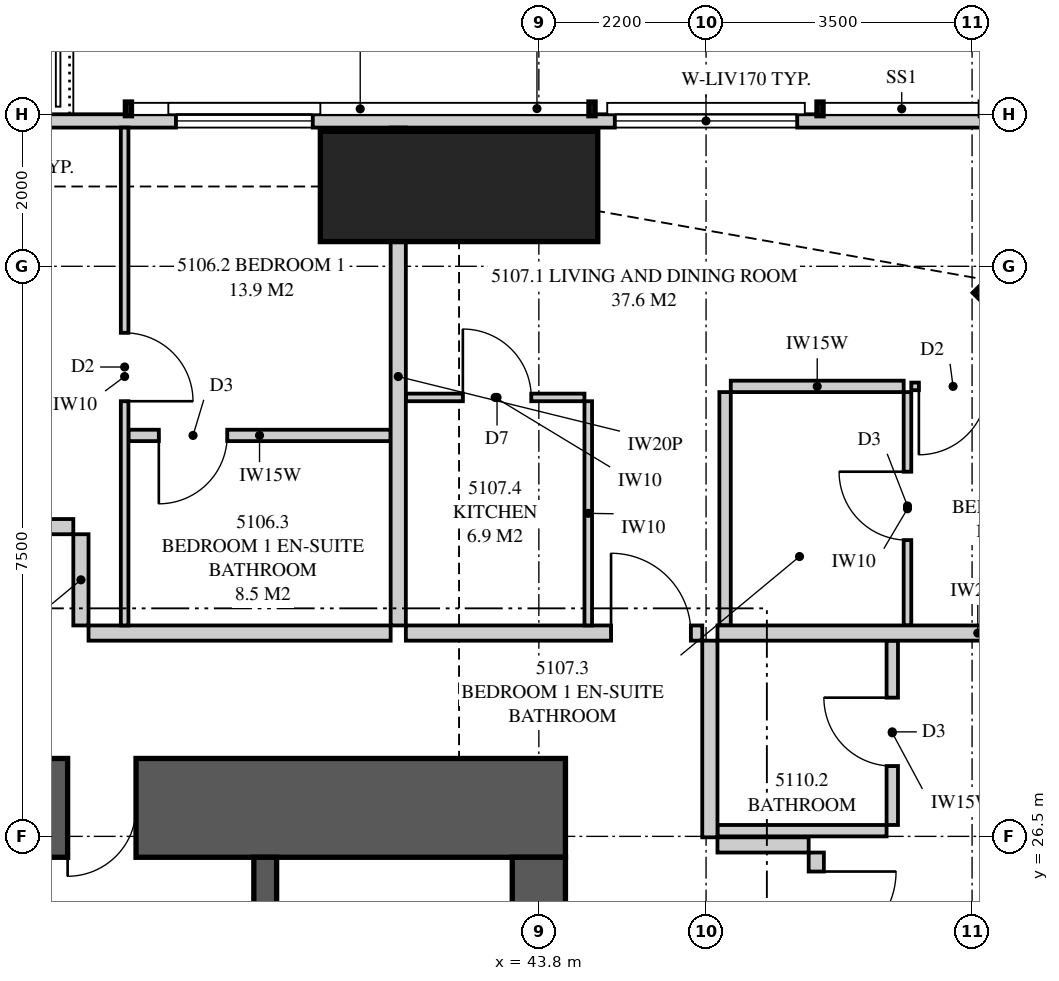
"""IFC4 building model, lengths in metres.
Left out: names, types, materials, properties, quantities, classifications, styles, units other than length and angle.
Written with IfcOpenShell. Run it as: python <this file> out.ifc"""

import sys

from ifc_helpers import new_model, si_unit, direction, frame, frame_2d, origin, origin_2d, place, context, subcontext, project, spatial, polyline, rectangle, outline, extrude, element, fill, save


model = new_model("IFC4")
c1 = context("Model", 3, precision=1e-05, world=origin(), true_north=direction((0.0, 1.0)))
c2 = subcontext(c1, "Body", "Model", "MODEL_VIEW")
j1 = project(units=[si_unit("LENGTHUNIT", "METRE"), si_unit("PLANEANGLEUNIT", "RADIAN")], contexts=[c1])
p1 = place(None, origin())
s1 = spatial("IfcSite", under=j1, at=p1, CompositionType="ELEMENT")
p2 = place(p1, origin())
s2 = spatial("IfcBuilding", under=s1, at=p2, CompositionType="ELEMENT")
p3 = place(p2, frame((0.0, 0.0, 187.85)))
s3 = spatial("IfcBuildingStorey", under=s2, at=p3, CompositionType="ELEMENT", Elevation=187.85)
p4 = place(p3, frame((50.652, 33.652, 0.0), z_axis=(0.0, 0.0, 1.0), x_axis=(0.707106781187, 0.707106781187, 0.0)))
e1 = element("IfcColumn", 1, at=p4, inside=s3, PredefinedType="COLUMN", context=c2, shape_type="SweptSolid", body=[
    extrude(rectangle(XDim=1.6, YDim=1.6, at=origin_2d()), origin(), (0.0, 0.0, 1.0), 3.35),
])
p5 = place(p3, frame((42.75, 35.05, 0.0), z_axis=(0.0, 0.0, 1.0), x_axis=(0.0, 1.0, 0.0)))
e2 = element("IfcColumn", 2, at=p5, inside=s3, PredefinedType="COLUMN", context=c2, shape_type="SweptSolid", body=[
    extrude(rectangle(XDim=1.45, YDim=3.65, at=origin_2d()), origin(), (0.0, 0.0, 1.0), 3.35),
])
p6 = place(p3, frame((44.15, 26.875, 0.0), z_axis=(0.0, 0.0, 1.0), x_axis=(-1.0, 0.0, 0.0)))
e3 = element("IfcWall", 3, at=p6, inside=s3, PredefinedType="SHEAR", context=c2, shape_type="SweptSolid", body=[
    extrude(rectangle(XDim=8.25, YDim=1.3, at=frame_2d((4.125, 0.0))), origin(), (0.0, 0.0, 1.0), 3.35),
])
p7 = place(p6, frame((5.65, 0.0, 0.0)))
e4 = element("IfcOpeningElement", 4, at=p7, cuts=e3, PredefinedType="OPENING", context=c2, shape_type="SweptSolid", body=[
    extrude(rectangle(XDim=0.9, YDim=2.1, at=frame_2d((0.45, 1.05))), frame((0.0, 0.66, 0.0), z_axis=(0.0, -1.0, 0.0), x_axis=(1.0, 0.0, 0.0)), (0.0, 0.0, 1.0), 1.32),
])
p8 = place(p3, frame((43.8, 19.3, 0.0), z_axis=(0.0, 0.0, 1.0), x_axis=(0.0, 1.0, 0.0)))
e5 = element("IfcWall", 5, at=p8, inside=s3, PredefinedType="SHEAR", context=c2, shape_type="SweptSolid", body=[
    extrude(rectangle(XDim=6.925, YDim=0.7, at=frame_2d((3.462, 0.0))), origin(), (0.0, 0.0, 1.0), 3.35),
])
p9 = place(p3, frame((40.2, 18.5, 0.0), z_axis=(0.0, 0.0, 1.0), x_axis=(0.0, 1.0, 0.0)))
e6 = element("IfcWall", 6, at=p9, inside=s3, PredefinedType="SHEAR", context=c2, shape_type="SweptSolid", body=[
    extrude(rectangle(XDim=7.725, YDim=0.3, at=frame_2d((3.863, 0.0))), origin(), (0.0, 0.0, 1.0), 3.35),
])
p10 = place(p3, frame((49.949, 35.913, 0.0), z_axis=(0.0, 0.0, 1.0), x_axis=(-1.0, 0.0, 0.0)))
e7 = element("IfcWall", 7, at=p10, inside=s3, PredefinedType="SOLIDWALL", context=c2, shape_type="SweptSolid", body=[
    extrude(outline(polyline([(0.0, 0.0), (34.897, 0.0), (34.897, 3.11), (27.91, 3.11), (27.91, 2.15), (27.836, 2.15), (27.836, 3.11), (27.699, 3.11), (27.699, 2.15), (7.199, 2.15), (7.199, 3.11), (7.062, 3.11), (7.062, 2.15), (6.987, 2.15), (6.987, 3.11), (0.0, 3.11), (0.0, 0.0)])), frame((0.0, 0.087, 0.0), z_axis=(0.0, -1.0, 0.0), x_axis=(1.0, 0.0, 0.0)), (0.0, 0.0, 1.0), 0.175),
])
p11 = place(p10, frame((2.75, 0.0, 0.4)))
e8 = element("IfcOpeningElement", 8, at=p11, cuts=e7, PredefinedType="OPENING", context=c2, shape_type="SweptSolid", body=[
    extrude(rectangle(XDim=2.4, YDim=1.7, at=frame_2d((1.2, 0.85))), frame((0.0, 0.097, 0.0), z_axis=(0.0, -1.0, 0.0), x_axis=(1.0, 0.0, 0.0)), (0.0, 0.0, 1.0), 0.195),
])
p12 = place(p10, frame((9.124, 0.0, 0.4)))
e9 = element("IfcOpeningElement", 9, at=p12, cuts=e7, PredefinedType="OPENING", context=c2, shape_type="SweptSolid", body=[
    extrude(rectangle(XDim=1.8, YDim=1.7, at=frame_2d((0.9, 0.85))), frame((0.0, 0.097, 0.0), z_axis=(0.0, -1.0, 0.0), x_axis=(1.0, 0.0, 0.0)), (0.0, 0.0, 1.0), 0.195),
])
p13 = place(p10, frame((13.174, 0.0, 0.0)))
e10 = element("IfcOpeningElement", 10, at=p13, cuts=e7, PredefinedType="OPENING", context=c2, shape_type="SweptSolid", body=[
    extrude(rectangle(XDim=1.8, YDim=2.1, at=frame_2d((0.9, 1.05))), frame((0.0, 0.097, 0.0), z_axis=(0.0, -1.0, 0.0), x_axis=(1.0, 0.0, 0.0)), (0.0, 0.0, 1.0), 0.195),
])
p14 = place(p10, frame((19.849, 0.0, 0.4)))
e11 = element("IfcOpeningElement", 11, at=p14, cuts=e7, PredefinedType="OPENING", context=c2, shape_type="SweptSolid", body=[
    extrude(rectangle(XDim=1.8, YDim=1.7, at=frame_2d((0.9, 0.85))), frame((0.0, 0.097, 0.0), z_axis=(0.0, -1.0, 0.0), x_axis=(1.0, 0.0, 0.0)), (0.0, 0.0, 1.0), 0.195),
])
p15 = place(p10, frame((23.304, 0.0, 0.4)))
e12 = element("IfcOpeningElement", 12, at=p15, cuts=e7, PredefinedType="OPENING", context=c2, shape_type="SweptSolid", body=[
    extrude(rectangle(XDim=2.4, YDim=1.7, at=frame_2d((1.2, 0.85))), frame((0.0, 0.097, 0.0), z_axis=(0.0, -1.0, 0.0), x_axis=(1.0, 0.0, 0.0)), (0.0, 0.0, 1.0), 0.195),
])
p16 = place(p10, frame((30.249, 0.0, 0.4)))
e13 = element("IfcOpeningElement", 13, at=p16, cuts=e7, PredefinedType="OPENING", context=c2, shape_type="SweptSolid", body=[
    extrude(rectangle(XDim=1.8, YDim=1.7, at=frame_2d((0.9, 0.85))), frame((0.0, 0.097, 0.0), z_axis=(0.0, -1.0, 0.0), x_axis=(1.0, 0.0, 0.0)), (0.0, 0.0, 1.0), 0.195),
])
p17 = place(p3, frame((41.95, 35.825, 0.0), z_axis=(0.0, 0.0, 1.0), x_axis=(0.0, -1.0, 0.0)))
e14 = element("IfcWall", 14, at=p17, inside=s3, PredefinedType="PARTITIONING", context=c2, shape_type="SweptSolid", body=[
    extrude(outline(polyline([(0.529, 2.15), (0.0, 2.15), (0.0, 0.0), (0.529, 0.0), (0.529, 0.746), (1.021, 0.746), (1.021, 0.0), (6.55, 0.0), (6.55, 3.11), (1.685, 3.11), (1.685, 2.15), (1.021, 2.15), (1.021, 1.404), (0.529, 1.404), (0.529, 2.15)])), frame((0.0, 0.1, 0.0), z_axis=(0.0, -1.0, 0.0), x_axis=(1.0, 0.0, 0.0)), (0.0, 0.0, 1.0), 0.2),
])
p18 = place(p3, frame((38.35, 35.825, 0.0), z_axis=(0.0, 0.0, 1.0), x_axis=(0.0, -1.0, 0.0)))
e15 = element("IfcWall", 15, at=p18, inside=s3, PredefinedType="PARTITIONING", context=c2, shape_type="SweptSolid", body=[
    extrude(outline(polyline([(0.0, 0.0), (6.55, 0.0), (6.55, 3.11), (1.635, 3.11), (1.635, 2.15), (0.0, 2.15), (0.0, 3.11), (0.0, 0.0)])), frame((0.0, 0.05, 0.0), z_axis=(0.0, -1.0, 0.0), x_axis=(1.0, 0.0, 0.0)), (0.0, 0.0, 1.0), 0.1),
])
p19 = place(p18, frame((2.7, 0.0, 0.0)))
e16 = element("IfcOpeningElement", 16, at=p19, cuts=e15, PredefinedType="OPENING", context=c2, shape_type="SweptSolid", body=[
    extrude(rectangle(XDim=0.9, YDim=2.1, at=frame_2d((0.45, 1.05))), frame((0.0, 0.06, 0.0), z_axis=(0.0, -1.0, 0.0), x_axis=(1.0, 0.0, 0.0)), (0.0, 0.0, 1.0), 0.12),
])
p20 = place(p3, frame((38.4, 31.775, 0.0), z_axis=(0.0, 0.0, 1.0), x_axis=(1.0, 0.0, 0.0)))
e17 = element("IfcWall", 17, at=p20, inside=s3, PredefinedType="PLUMBINGWALL", context=c2, shape_type="SweptSolid", body=[
    extrude(rectangle(XDim=3.45, YDim=0.15, at=frame_2d((1.725, 0.0))), origin(), (0.0, 0.0, 1.0), 3.11),
])
p21 = place(p20, frame((0.4, 0.0, 0.0)))
e18 = element("IfcOpeningElement", 18, at=p21, cuts=e17, PredefinedType="OPENING", context=c2, shape_type="SweptSolid", body=[
    extrude(rectangle(XDim=0.9, YDim=2.1, at=frame_2d((0.45, 1.05))), frame((0.0, 0.085, 0.0), z_axis=(0.0, -1.0, 0.0), x_axis=(1.0, 0.0, 0.0)), (0.0, 0.0, 1.0), 0.17),
])
p22 = place(p3, frame((42.05, 29.175, 0.0), z_axis=(0.0, 0.0, 1.0), x_axis=(1.0, 0.0, 0.0)))
e19 = element("IfcWall", 19, at=p22, inside=s3, PredefinedType="PARTITIONING", context=c2, shape_type="SweptSolid", body=[
    extrude(outline(polyline([(0.0, 0.0), (3.9, 0.0), (3.9, 3.11), (1.037, 3.11), (1.037, 2.541), (0.363, 2.541), (0.363, 3.11), (0.0, 3.11), (0.0, 0.0)])), frame((0.0, 0.1, 0.0), z_axis=(0.0, -1.0, 0.0), x_axis=(1.0, 0.0, 0.0)), (0.0, 0.0, 1.0), 0.2),
])
p23 = place(p22, frame((2.7, 0.0, 0.0)))
e20 = element("IfcOpeningElement", 20, at=p23, cuts=e19, PredefinedType="OPENING", context=c2, shape_type="SweptSolid", body=[
    extrude(rectangle(XDim=1.05, YDim=2.2, at=frame_2d((0.525, 1.1))), frame((0.0, 0.11, 0.0), z_axis=(0.0, -1.0, 0.0), x_axis=(1.0, 0.0, 0.0)), (0.0, 0.0, 1.0), 0.22),
])
p24 = place(p3, frame((48.65, 32.345, 0.0), z_axis=(0.0, 0.0, 1.0), x_axis=(0.0, -1.0, 0.0)))
e21 = element("IfcWall", 21, at=p24, inside=s3, PredefinedType="PARTITIONING", context=c2, shape_type="SweptSolid", body=[
    extrude(rectangle(XDim=3.07, YDim=0.1, at=frame_2d((1.535, 0.0))), origin(), (0.0, 0.0, 1.0), 3.11),
])
p25 = place(p24, frame((1.048, 0.0, 0.0)))
e22 = element("IfcOpeningElement", 22, at=p25, cuts=e21, PredefinedType="OPENING", context=c2, shape_type="SweptSolid", body=[
    extrude(rectangle(XDim=0.9, YDim=2.1, at=frame_2d((0.45, 1.05))), frame((0.0, 0.06, 0.0), z_axis=(0.0, -1.0, 0.0), x_axis=(1.0, 0.0, 0.0)), (0.0, 0.0, 1.0), 0.12),
])
p26 = place(p3, frame((48.7, 32.42, 0.0), z_axis=(0.0, 0.0, 1.0), x_axis=(1.0, 0.0, 0.0)))
e23 = element("IfcWall", 23, at=p26, inside=s3, PredefinedType="PARTITIONING", context=c2, shape_type="SweptSolid", body=[
    extrude(outline(polyline([(0.0, 0.0), (4.3, 0.0), (4.3, 3.11), (3.022, 3.11), (3.022, 2.15), (1.279, 2.15), (1.279, 3.11), (0.0, 3.11), (0.0, 0.0)])), frame((0.0, 0.05, 0.0), z_axis=(0.0, -1.0, 0.0), x_axis=(1.0, 0.0, 0.0)), (0.0, 0.0, 1.0), 0.1),
])
p27 = place(p26, frame((0.1, 0.0, 0.0)))
e24 = element("IfcOpeningElement", 24, at=p27, cuts=e23, PredefinedType="OPENING", context=c2, shape_type="SweptSolid", body=[
    extrude(rectangle(XDim=0.9, YDim=2.1, at=frame_2d((0.45, 1.05))), frame((0.0, 0.06, 0.0), z_axis=(0.0, -1.0, 0.0), x_axis=(1.0, 0.0, 0.0)), (0.0, 0.0, 1.0), 0.12),
])
p28 = place(p3, frame((46.325, 32.42, 0.0), z_axis=(0.0, 0.0, 1.0), x_axis=(1.0, 0.0, 0.0)))
e25 = element("IfcWall", 25, at=p28, inside=s3, PredefinedType="PLUMBINGWALL", context=c2, shape_type="SweptSolid", body=[
    extrude(rectangle(XDim=2.275, YDim=0.15, at=frame_2d((1.138, 0.0))), origin(), (0.0, 0.0, 1.0), 3.11),
])
p29 = place(p3, frame((46.25, 32.345, 0.0), z_axis=(0.0, 0.0, 1.0), x_axis=(0.0, -1.0, 0.0)))
e26 = element("IfcWall", 26, at=p29, inside=s3, PredefinedType="PLUMBINGWALL", context=c2, shape_type="SweptSolid", body=[
    extrude(rectangle(XDim=3.07, YDim=0.15, at=frame_2d((1.535, 0.0))), origin(), (0.0, 0.0, 1.0), 3.11),
])
p30 = place(p3, frame((42.05, 32.275, 0.0), z_axis=(0.0, 0.0, 1.0), x_axis=(1.0, 0.0, 0.0)))
e27 = element("IfcWall", 27, at=p30, inside=s3, PredefinedType="PARTITIONING", context=c2, shape_type="SweptSolid", body=[
    extrude(outline(polyline([(0.0, 0.0), (2.35, 0.0), (2.35, 3.11), (0.987, 3.11), (0.987, 2.541), (0.413, 2.541), (0.413, 3.11), (0.0, 3.11), (0.0, 0.0)])), frame((0.0, 0.05, 0.0), z_axis=(0.0, -1.0, 0.0), x_axis=(1.0, 0.0, 0.0)), (0.0, 0.0, 1.0), 0.1),
])
p31 = place(p30, frame((0.75, 0.0, 0.0)))
e28 = element("IfcOpeningElement", 28, at=p31, cuts=e27, PredefinedType="OPENING", context=c2, shape_type="SweptSolid", body=[
    extrude(rectangle(XDim=0.9, YDim=2.1, at=frame_2d((0.45, 1.05))), frame((0.0, 0.06, 0.0), z_axis=(0.0, -1.0, 0.0), x_axis=(1.0, 0.0, 0.0)), (0.0, 0.0, 1.0), 0.12),
])
p32 = place(p3, frame((44.45, 32.225, 0.0), z_axis=(0.0, 0.0, 1.0), x_axis=(0.0, -1.0, 0.0)))
e29 = element("IfcWall", 29, at=p32, inside=s3, PredefinedType="PARTITIONING", context=c2, shape_type="SweptSolid", body=[
    extrude(rectangle(XDim=2.95, YDim=0.1, at=frame_2d((1.475, 0.0))), origin(), (0.0, 0.0, 1.0), 3.11),
])
p33 = place(p3, frame((46.15, 29.175, 0.0), z_axis=(0.0, 0.0, 1.0), x_axis=(1.0, 0.0, 0.0)))
e30 = element("IfcWall", 30, at=p33, inside=s3, PredefinedType="PARTITIONING", context=c2, shape_type="SweptSolid", body=[
    extrude(outline(polyline([(0.0, 0.0), (6.85, 0.0), (6.85, 3.11), (6.147, 3.11), (6.147, 2.15), (4.303, 2.15), (4.303, 3.11), (0.0, 3.11), (0.0, 0.0)])), frame((0.0, 0.1, 0.0), z_axis=(0.0, -1.0, 0.0), x_axis=(1.0, 0.0, 0.0)), (0.0, 0.0, 1.0), 0.2),
])
p34 = place(p3, frame((48.45, 26.65, 0.0), z_axis=(0.0, 0.0, 1.0), x_axis=(0.0, 1.0, 0.0)))
e31 = element("IfcWall", 31, at=p34, inside=s3, PredefinedType="PLUMBINGWALL", context=c2, shape_type="SweptSolid", body=[
    extrude(rectangle(XDim=2.425, YDim=0.15, at=frame_2d((1.212, 0.0))), origin(), (0.0, 0.0, 1.0), 3.11),
])
p35 = place(p34, frame((0.775, 0.0, 0.0)))
e32 = element("IfcOpeningElement", 32, at=p35, cuts=e31, PredefinedType="OPENING", context=c2, shape_type="SweptSolid", body=[
    extrude(rectangle(XDim=0.9, YDim=2.1, at=frame_2d((0.45, 1.05))), frame((0.0, 0.085, 0.0), z_axis=(0.0, -1.0, 0.0), x_axis=(1.0, 0.0, 0.0)), (0.0, 0.0, 1.0), 0.17),
])
p36 = place(p3, frame((48.375, 26.575, 0.0), z_axis=(0.0, 0.0, 1.0), x_axis=(-1.0, 0.0, 0.0)))
e33 = element("IfcWall", 33, at=p36, inside=s3, PredefinedType="PLUMBINGWALL", context=c2, shape_type="SweptSolid", body=[
    extrude(rectangle(XDim=2.225, YDim=0.15, at=frame_2d((1.113, 0.0))), origin(), (0.0, 0.0, 1.0), 3.11),
])
p37 = place(p3, frame((37.875, 29.175, 0.0), z_axis=(0.0, 0.0, 1.0), x_axis=(1.0, 0.0, 0.0)))
e34 = element("IfcWall", 34, at=p37, inside=s3, PredefinedType="PARTITIONING", context=c2, shape_type="SweptSolid", body=[
    extrude(rectangle(XDim=3.975, YDim=0.2, at=frame_2d((1.988, 0.0))), origin(), (0.0, 0.0, 1.0), 3.11),
])
p38 = place(p3, frame((35.275, 30.575, 0.0), z_axis=(0.0, 0.0, 1.0), x_axis=(1.0, 0.0, 0.0)))
e35 = element("IfcWall", 35, at=p38, inside=s3, PredefinedType="PARTITIONING", context=c2, shape_type="SweptSolid", body=[
    extrude(rectangle(XDim=2.4, YDim=0.2, at=frame_2d((1.2, 0.0))), origin(), (0.0, 0.0, 1.0), 3.11),
])
p39 = place(p38, frame((0.7, 0.0, 0.0)))
e36 = element("IfcOpeningElement", 36, at=p39, cuts=e35, PredefinedType="OPENING", context=c2, shape_type="SweptSolid", body=[
    extrude(rectangle(XDim=1.05, YDim=2.2, at=frame_2d((0.525, 1.1))), frame((0.0, 0.11, 0.0), z_axis=(0.0, -1.0, 0.0), x_axis=(1.0, 0.0, 0.0)), (0.0, 0.0, 1.0), 0.22),
])
p40 = place(p3, frame((37.775, 29.275, 0.0), z_axis=(0.0, 0.0, 1.0), x_axis=(0.0, 1.0, 0.0)))
e37 = element("IfcWall", 37, at=p40, inside=s3, PredefinedType="PARTITIONING", context=c2, shape_type="SweptSolid", body=[
    extrude(rectangle(XDim=1.2, YDim=0.2, at=frame_2d((0.6, 0.0))), origin(), (0.0, 0.0, 1.0), 3.11),
])
p41 = place(p3, frame((46.05, 26.488, 0.0), z_axis=(0.0, 0.0, 1.0), x_axis=(0.0, 1.0, 0.0)))
e38 = element("IfcWall", 38, at=p41, inside=s3, PredefinedType="PARTITIONING", context=c2, shape_type="SweptSolid", body=[
    extrude(rectangle(XDim=2.587, YDim=0.2, at=frame_2d((1.294, 0.0))), origin(), (0.0, 0.0, 1.0), 3.11),
])
p42 = place(p3, frame((47.45, 23.887, 0.0), z_axis=(0.0, 0.0, 1.0), x_axis=(0.0, 1.0, 0.0)))
e39 = element("IfcWall", 39, at=p42, inside=s3, PredefinedType="PARTITIONING", context=c2, shape_type="SweptSolid", body=[
    extrude(outline(polyline([(0.0, 0.0), (2.4, 0.0), (2.4, 3.11), (1.45, 3.11), (1.45, 2.541), (0.775, 2.541), (0.775, 3.11), (0.0, 3.11), (0.0, 0.0)])), frame((0.0, 0.1, 0.0), z_axis=(0.0, -1.0, 0.0), x_axis=(1.0, 0.0, 0.0)), (0.0, 0.0, 1.0), 0.2),
])
p43 = place(p42, frame((1.1, 0.0, 0.0)))
e40 = element("IfcOpeningElement", 40, at=p43, cuts=e39, PredefinedType="OPENING", context=c2, shape_type="SweptSolid", body=[
    extrude(rectangle(XDim=1.05, YDim=2.2, at=frame_2d((0.525, 1.1))), frame((0.0, 0.11, 0.0), z_axis=(0.0, -1.0, 0.0), x_axis=(1.0, 0.0, 0.0)), (0.0, 0.0, 1.0), 0.22),
])
p44 = place(p3, frame((46.15, 26.387, 0.0), z_axis=(0.0, 0.0, 1.0), x_axis=(1.0, 0.0, 0.0)))
e41 = element("IfcWall", 41, at=p44, inside=s3, PredefinedType="PARTITIONING", context=c2, shape_type="SweptSolid", body=[
    extrude(rectangle(XDim=1.2, YDim=0.2, at=frame_2d((0.6, 0.0))), origin(), (0.0, 0.0, 1.0), 3.11),
])
p45 = place(p11, origin())
e42 = element("IfcWindow", 42, at=p45, inside=s3, PartitioningType="SINGLE_PANEL", PredefinedType="WINDOW", context=c2, shape_type="SweptSolid", body=[
    extrude(rectangle(XDim=2.4, YDim=1.7, at=frame_2d((1.2, 0.85))), frame((0.0, 0.03, 0.0), z_axis=(0.0, -1.0, 0.0), x_axis=(1.0, 0.0, 0.0)), (0.0, 0.0, 1.0), 0.06),
])
fill(e8, e42)
p46 = place(p12, origin())
e43 = element("IfcWindow", 43, at=p46, inside=s3, PartitioningType="SINGLE_PANEL", PredefinedType="WINDOW", context=c2, shape_type="SweptSolid", body=[
    extrude(rectangle(XDim=1.8, YDim=1.7, at=frame_2d((0.9, 0.85))), frame((0.0, 0.03, 0.0), z_axis=(0.0, -1.0, 0.0), x_axis=(1.0, 0.0, 0.0)), (0.0, 0.0, 1.0), 0.06),
])
fill(e9, e43)
p47 = place(p19, origin())
e44 = element("IfcDoor", 44, at=p47, inside=s3, OperationType="SINGLE_SWING_RIGHT", PredefinedType="DOOR", context=c2, shape_type="SweptSolid", body=[
    extrude(rectangle(XDim=0.9, YDim=2.1, at=frame_2d((0.45, 1.05))), frame((0.0, 0.025, 0.0), z_axis=(0.0, -1.0, 0.0), x_axis=(1.0, 0.0, 0.0)), (0.0, 0.0, 1.0), 0.05),
])
fill(e16, e44)
p48 = place(p21, frame((0.9, 0.0, 0.0), z_axis=(0.0, 0.0, 1.0), x_axis=(-1.0, 0.0, 0.0)))
e45 = element("IfcDoor", 45, at=p48, inside=s3, OperationType="SINGLE_SWING_RIGHT", PredefinedType="DOOR", context=c2, shape_type="SweptSolid", body=[
    extrude(rectangle(XDim=0.9, YDim=2.1, at=frame_2d((0.45, 1.05))), frame((0.0, 0.025, 0.0), z_axis=(0.0, -1.0, 0.0), x_axis=(1.0, 0.0, 0.0)), (0.0, 0.0, 1.0), 0.05),
])
fill(e18, e45)
p49 = place(p23, origin())
e46 = element("IfcDoor", 46, at=p49, inside=s3, OperationType="SINGLE_SWING_LEFT", PredefinedType="DOOR", context=c2, shape_type="SweptSolid", body=[
    extrude(rectangle(XDim=1.05, YDim=2.2, at=frame_2d((0.525, 1.1))), frame((0.0, 0.025, 0.0), z_axis=(0.0, -1.0, 0.0), x_axis=(1.0, 0.0, 0.0)), (0.0, 0.0, 1.0), 0.05),
])
fill(e20, e46)
p50 = place(p27, frame((0.9, 0.0, 0.0), z_axis=(0.0, 0.0, 1.0), x_axis=(-1.0, 0.0, 0.0)))
e47 = element("IfcDoor", 47, at=p50, inside=s3, OperationType="SINGLE_SWING_RIGHT", PredefinedType="DOOR", context=c2, shape_type="SweptSolid", body=[
    extrude(rectangle(XDim=0.9, YDim=2.1, at=frame_2d((0.45, 1.05))), frame((0.0, 0.025, 0.0), z_axis=(0.0, -1.0, 0.0), x_axis=(1.0, 0.0, 0.0)), (0.0, 0.0, 1.0), 0.05),
])
fill(e24, e47)
p51 = place(p25, frame((0.9, 0.0, 0.0), z_axis=(0.0, 0.0, 1.0), x_axis=(-1.0, 0.0, 0.0)))
e48 = element("IfcDoor", 48, at=p51, inside=s3, OperationType="SINGLE_SWING_RIGHT", PredefinedType="DOOR", context=c2, shape_type="SweptSolid", body=[
    extrude(rectangle(XDim=0.9, YDim=2.1, at=frame_2d((0.45, 1.05))), frame((0.0, 0.025, 0.0), z_axis=(0.0, -1.0, 0.0), x_axis=(1.0, 0.0, 0.0)), (0.0, 0.0, 1.0), 0.05),
])
fill(e22, e48)
p52 = place(p31, origin())
e49 = element("IfcDoor", 49, at=p52, inside=s3, OperationType="SINGLE_SWING_LEFT", PredefinedType="DOOR", context=c2, shape_type="SweptSolid", body=[
    extrude(rectangle(XDim=0.9, YDim=2.1, at=frame_2d((0.45, 1.05))), frame((0.0, 0.025, 0.0), z_axis=(0.0, -1.0, 0.0), x_axis=(1.0, 0.0, 0.0)), (0.0, 0.0, 1.0), 0.05),
])
fill(e28, e49)
p53 = place(p43, frame((1.05, 0.0, 0.0), z_axis=(0.0, 0.0, 1.0), x_axis=(-1.0, 0.0, 0.0)))
e50 = element("IfcDoor", 50, at=p53, inside=s3, OperationType="SINGLE_SWING_LEFT", PredefinedType="DOOR", context=c2, shape_type="SweptSolid", body=[
    extrude(rectangle(XDim=1.05, YDim=2.2, at=frame_2d((0.525, 1.1))), frame((0.0, 0.025, 0.0), z_axis=(0.0, -1.0, 0.0), x_axis=(1.0, 0.0, 0.0)), (0.0, 0.0, 1.0), 0.05),
])
fill(e40, e50)
p54 = place(p35, origin())
e51 = element("IfcDoor", 51, at=p54, inside=s3, OperationType="SINGLE_SWING_RIGHT", PredefinedType="DOOR", context=c2, shape_type="SweptSolid", body=[
    extrude(rectangle(XDim=0.9, YDim=2.1, at=frame_2d((0.45, 1.05))), frame((0.0, 0.025, 0.0), z_axis=(0.0, -1.0, 0.0), x_axis=(1.0, 0.0, 0.0)), (0.0, 0.0, 1.0), 0.05),
])
fill(e32, e51)
p55 = place(p7, origin())
e52 = element("IfcDoor", 52, at=p55, inside=s3, OperationType="SINGLE_SWING_RIGHT", PredefinedType="DOOR", context=c2, shape_type="SweptSolid", body=[
    extrude(rectangle(XDim=0.9, YDim=2.1, at=frame_2d((0.45, 1.05))), frame((0.0, 0.47, 0.0), z_axis=(0.0, -1.0, 0.0), x_axis=(1.0, 0.0, 0.0)), (0.0, 0.0, 1.0), 0.8),
])
fill(e4, e52)
save(model, sys.argv[1])
